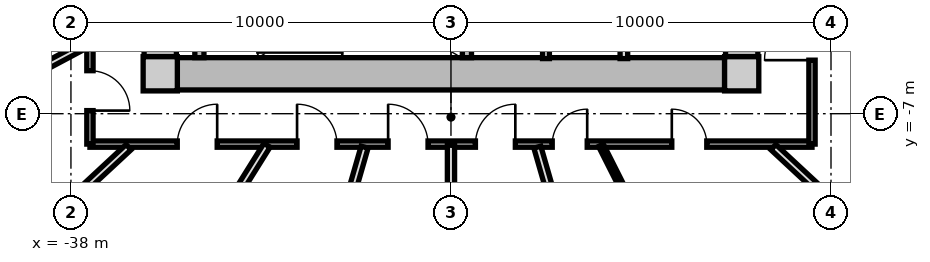
"""IFC4 building model, lengths in metres.
Left out: names, types, materials, properties, quantities, classifications, styles, units other than length and angle.
Written with IfcOpenShell. Run it as: python <this file> out.ifc"""

import sys

from ifc_helpers import new_model, si_unit, direction, frame, frame_2d, origin, origin_2d, place, context, subcontext, project, spatial, rectangle, extrude, source, transform, mapped, element, fill, save


model = new_model("IFC4")
c1 = context("Model", 3, precision=1e-05, world=origin(), true_north=direction((0.0, 1.0)))
c2 = subcontext(c1, "Body", "Model", "MODEL_VIEW")
j1 = project(units=[si_unit("LENGTHUNIT", "METRE"), si_unit("PLANEANGLEUNIT", "RADIAN")], contexts=[c1])
p1 = place(None, origin())
s1 = spatial("IfcSite", under=j1, at=p1, CompositionType="ELEMENT")
p2 = place(p1, origin())
s2 = spatial("IfcBuilding", under=s1, at=p2, CompositionType="ELEMENT")
p3 = place(p2, frame((0.0, 0.0, 46.0)))
s3 = spatial("IfcBuildingStorey", under=s2, at=p3, CompositionType="ELEMENT", Elevation=46.0)
m1 = source(origin(), c2, "Body", "SweptSolid", [
    extrude(rectangle(XDim=0.9, YDim=0.9, at=origin_2d()), origin(), (0.0, 0.0, 1.0), 3.05),
])
for number, where, z_axis, x_axis in (
    (1, (-35.65, -5.95, 0.0), (0.0, 0.0, 1.0), (1.0, 0.0, 0.0)),
    (2, (-20.35, -5.95, 0.0), (0.0, 0.0, 1.0), (1.0, 0.0, 0.0)),
):
    element("IfcColumn", number, at=place(p3, frame(where, z_axis=z_axis, x_axis=x_axis)), inside=s3, PredefinedType="COLUMN", context=c2, shape_type="MappedRepresentation", body=[
        mapped(m1, transform((0.0, 0.0, 0.0), x_axis=(1.0, 0.0, 0.0), y_axis=(0.0, 1.0, 0.0), z_axis=(0.0, 0.0, 1.0), scale=1.0)),
    ])
m2 = source(origin(), c2, "Body", "SweptSolid", [
    extrude(rectangle(XDim=14.4, YDim=0.85, at=frame_2d((7.2, 0.0))), origin(), (0.0, 0.0, 1.0), 2.79),
])
p4 = place(p3, frame((-20.8, -5.95, 0.0), z_axis=(0.0, 0.0, 1.0), x_axis=(-1.0, 0.0, 0.0)))
e3 = element("IfcWall", 3, at=p4, inside=s3, PredefinedType="SHEAR", context=c2, shape_type="MappedRepresentation", body=[
    mapped(m2, transform((0.0, 0.0, 0.0), x_axis=(1.0, 0.0, 0.0), y_axis=(0.0, 1.0, 0.0), z_axis=(0.0, 0.0, 1.0), scale=1.0)),
])
m3 = source(origin(), c2, "Body", "SweptSolid", [
    extrude(rectangle(XDim=11.0, YDim=0.85, at=frame_2d((5.5, 0.0))), origin(), (0.0, 0.0, 1.0), 2.79),
])
p5 = place(p3, frame((-35.65, -5.5, 0.0), z_axis=(0.0, 0.0, 1.0), x_axis=(0.0, 1.0, 0.0)))
e4 = element("IfcWall", 4, at=p5, inside=s3, PredefinedType="SHEAR", context=c2, shape_type="MappedRepresentation", body=[
    mapped(m3, transform((0.0, 0.0, 0.0), x_axis=(1.0, 0.0, 0.0), y_axis=(0.0, 1.0, 0.0), z_axis=(0.0, 0.0, 1.0), scale=1.0)),
])
p6 = place(p5, frame((3.8, 0.0, 0.0)))
e5 = element("IfcOpeningElement", 5, at=p6, cuts=e4, PredefinedType="OPENING", context=c2, shape_type="SweptSolid", body=[
    extrude(rectangle(XDim=1.2, YDim=2.15, at=frame_2d((0.6, 1.075))), frame((0.0, 0.435, 0.0), z_axis=(0.0, -1.0, 0.0), x_axis=(1.0, 0.0, 0.0)), (0.0, 0.0, 1.0), 0.87),
])
p7 = place(p3, frame((-20.35, 5.5, 0.0), z_axis=(0.0, 0.0, 1.0), x_axis=(0.0, -1.0, 0.0)))
e6 = element("IfcWall", 6, at=p7, inside=s3, PredefinedType="SHEAR", context=c2, shape_type="MappedRepresentation", body=[
    mapped(m3, transform((0.0, 0.0, 0.0), x_axis=(1.0, 0.0, 0.0), y_axis=(0.0, 1.0, 0.0), z_axis=(0.0, 0.0, 1.0), scale=1.0)),
])
p8 = place(p7, frame((5.65, 0.0, 0.0)))
e7 = element("IfcOpeningElement", 7, at=p8, cuts=e6, PredefinedType="OPENING", context=c2, shape_type="SweptSolid", body=[
    extrude(rectangle(XDim=1.2, YDim=2.15, at=frame_2d((0.6, 1.075))), frame((0.0, 0.435, 0.0), z_axis=(0.0, -1.0, 0.0), x_axis=(1.0, 0.0, 0.0)), (0.0, 0.0, 1.0), 0.87),
])
m4 = source(origin(), c2, "Body", "SweptSolid", [
    extrude(rectangle(XDim=3.075, YDim=0.24, at=frame_2d((1.538, 0.0))), origin(), (0.0, 0.0, 1.0), 2.79),
])
for number, where, z_axis, x_axis in (
    (8, (-34.62, -5.525, 0.0), (0.0, 0.0, 1.0), (0.0, 1.0, 0.0)),
    (9, (-27.58, -5.525, 0.0), (0.0, 0.0, 1.0), (0.0, 1.0, 0.0)),
):
    element("IfcWall", number, at=place(p3, frame(where, z_axis=z_axis, x_axis=x_axis)), inside=s3, PredefinedType="PARTITIONING", context=c2, shape_type="MappedRepresentation", body=[
        mapped(m4, transform((0.0, 0.0, 0.0), x_axis=(1.0, 0.0, 0.0), y_axis=(0.0, 1.0, 0.0), z_axis=(0.0, 0.0, 1.0), scale=1.0)),
    ])
m5 = source(origin(), c2, "Body", "SweptSolid", [
    extrude(rectangle(XDim=3.8, YDim=0.2, at=frame_2d((1.9, 0.0))), origin(), (0.0, 0.0, 1.0), 2.775),
])
p9 = place(p3, frame((-23.45, -5.55, 0.0), z_axis=(0.0, 0.0, 1.0), x_axis=(0.0, 1.0, 0.0)))
e10 = element("IfcWall", 10, at=p9, inside=s3, PredefinedType="PARTITIONING", context=c2, shape_type="MappedRepresentation", body=[
    mapped(m5, transform((0.0, 0.0, 0.0), x_axis=(1.0, 0.0, 0.0), y_axis=(0.0, 1.0, 0.0), z_axis=(0.0, 0.0, 1.0), scale=1.0)),
])
m6 = source(origin(), c2, "Body", "SweptSolid", [
    extrude(rectangle(XDim=3.22, YDim=0.18, at=frame_2d((1.61, 0.0))), origin(), (0.0, 0.0, 1.0), 2.775),
])
p10 = place(p3, frame((-25.5, -5.55, 0.0), z_axis=(0.0, 0.0, 1.0), x_axis=(0.0, 1.0, 0.0)))
e11 = element("IfcWall", 11, at=p10, inside=s3, PredefinedType="PARTITIONING", context=c2, shape_type="MappedRepresentation", body=[
    mapped(m6, transform((0.0, 0.0, 0.0), x_axis=(1.0, 0.0, 0.0), y_axis=(0.0, 1.0, 0.0), z_axis=(0.0, 0.0, 1.0), scale=1.0)),
])
m7 = source(origin(), c2, "Body", "SweptSolid", [
    extrude(rectangle(XDim=19.0, YDim=0.165, at=frame_2d((9.5, 0.0))), origin(), (0.0, 0.0, 1.0), 2.775),
])
p11 = place(p3, frame((-18.5, -7.8, 0.0), z_axis=(0.0, 0.0, 1.0), x_axis=(-1.0, 0.0, 0.0)))
e12 = element("IfcWall", 12, at=p11, inside=s3, PredefinedType="PARTITIONING", context=c2, shape_type="MappedRepresentation", body=[
    mapped(m7, transform((0.0, 0.0, 0.0), x_axis=(1.0, 0.0, 0.0), y_axis=(0.0, 1.0, 0.0), z_axis=(0.0, 0.0, 1.0), scale=1.0)),
])
p12 = place(p11, frame((15.652, 0.0, 0.0)))
e13 = element("IfcOpeningElement", 13, at=p12, cuts=e12, PredefinedType="OPENING", context=c2, shape_type="SweptSolid", body=[
    extrude(rectangle(XDim=1.05, YDim=2.15, at=frame_2d((0.525, 1.075))), frame((0.0, 0.093, 0.0), z_axis=(0.0, -1.0, 0.0), x_axis=(1.0, 0.0, 0.0)), (0.0, 0.0, 1.0), 0.185),
])
p13 = place(p11, frame((12.5, 0.0, 0.0)))
e14 = element("IfcOpeningElement", 14, at=p13, cuts=e12, PredefinedType="OPENING", context=c2, shape_type="SweptSolid", body=[
    extrude(rectangle(XDim=1.05, YDim=2.15, at=frame_2d((0.525, 1.075))), frame((0.0, 0.093, 0.0), z_axis=(0.0, -1.0, 0.0), x_axis=(1.0, 0.0, 0.0)), (0.0, 0.0, 1.0), 0.185),
])
p14 = place(p11, frame((10.104, 0.0, 0.0)))
e15 = element("IfcOpeningElement", 15, at=p14, cuts=e12, PredefinedType="OPENING", context=c2, shape_type="SweptSolid", body=[
    extrude(rectangle(XDim=1.05, YDim=2.15, at=frame_2d((0.525, 1.075))), frame((0.0, 0.093, 0.0), z_axis=(0.0, -1.0, 0.0), x_axis=(1.0, 0.0, 0.0)), (0.0, 0.0, 1.0), 0.185),
])
p15 = place(p11, frame((7.806, 0.0, 0.0)))
e16 = element("IfcOpeningElement", 16, at=p15, cuts=e12, PredefinedType="OPENING", context=c2, shape_type="SweptSolid", body=[
    extrude(rectangle(XDim=1.05, YDim=2.15, at=frame_2d((0.525, 1.075))), frame((0.0, 0.093, 0.0), z_axis=(0.0, -1.0, 0.0), x_axis=(1.0, 0.0, 0.0)), (0.0, 0.0, 1.0), 0.185),
])
p16 = place(p11, frame((5.915, 0.0, 0.0)))
e17 = element("IfcOpeningElement", 17, at=p16, cuts=e12, PredefinedType="OPENING", context=c2, shape_type="SweptSolid", body=[
    extrude(rectangle(XDim=0.92, YDim=2.1, at=frame_2d((0.46, 1.05))), frame((0.0, 0.093, 0.0), z_axis=(0.0, -1.0, 0.0), x_axis=(1.0, 0.0, 0.0)), (0.0, 0.0, 1.0), 0.185),
])
p17 = place(p11, frame((2.769, 0.0, 0.0)))
e18 = element("IfcOpeningElement", 18, at=p17, cuts=e12, PredefinedType="OPENING", context=c2, shape_type="SweptSolid", body=[
    extrude(rectangle(XDim=0.92, YDim=2.1, at=frame_2d((0.46, 1.05))), frame((0.0, 0.093, 0.0), z_axis=(0.0, -1.0, 0.0), x_axis=(1.0, 0.0, 0.0)), (0.0, 0.0, 1.0), 0.185),
])
m8 = source(origin(), c2, "Body", "SweptSolid", [
    extrude(rectangle(XDim=15.6, YDim=0.165, at=frame_2d((7.8, 0.0))), origin(), (0.0, 0.0, 1.0), 2.775),
])
p18 = place(p3, frame((-37.5, -7.8, 0.0), z_axis=(0.0, 0.0, 1.0), x_axis=(0.0, 1.0, 0.0)))
e19 = element("IfcWall", 19, at=p18, inside=s3, PredefinedType="PARTITIONING", context=c2, shape_type="MappedRepresentation", body=[
    mapped(m8, transform((0.0, 0.0, 0.0), x_axis=(1.0, 0.0, 0.0), y_axis=(0.0, 1.0, 0.0), z_axis=(0.0, 0.0, 1.0), scale=1.0)),
])
p19 = place(p18, frame((13.293, 0.0, 0.0)))
e20 = element("IfcOpeningElement", 20, at=p19, cuts=e19, PredefinedType="OPENING", context=c2, shape_type="SweptSolid", body=[
    extrude(rectangle(XDim=1.05, YDim=2.15, at=frame_2d((0.525, 1.075))), frame((0.0, 0.093, 0.0), z_axis=(0.0, -1.0, 0.0), x_axis=(1.0, 0.0, 0.0)), (0.0, 0.0, 1.0), 0.185),
])
p20 = place(p18, frame((11.018, 0.0, 0.0)))
e21 = element("IfcOpeningElement", 21, at=p20, cuts=e19, PredefinedType="OPENING", context=c2, shape_type="SweptSolid", body=[
    extrude(rectangle(XDim=1.05, YDim=2.15, at=frame_2d((0.525, 1.075))), frame((0.0, 0.093, 0.0), z_axis=(0.0, -1.0, 0.0), x_axis=(1.0, 0.0, 0.0)), (0.0, 0.0, 1.0), 0.185),
])
p21 = place(p18, frame((7.812, 0.0, 0.0)))
e22 = element("IfcOpeningElement", 22, at=p21, cuts=e19, PredefinedType="OPENING", context=c2, shape_type="SweptSolid", body=[
    extrude(rectangle(XDim=1.05, YDim=2.15, at=frame_2d((0.525, 1.075))), frame((0.0, 0.093, 0.0), z_axis=(0.0, -1.0, 0.0), x_axis=(1.0, 0.0, 0.0)), (0.0, 0.0, 1.0), 0.185),
])
p22 = place(p18, frame((6.035, 0.0, 0.0)))
e23 = element("IfcOpeningElement", 23, at=p22, cuts=e19, PredefinedType="OPENING", context=c2, shape_type="SweptSolid", body=[
    extrude(rectangle(XDim=1.05, YDim=2.15, at=frame_2d((0.525, 1.075))), frame((0.0, 0.093, 0.0), z_axis=(0.0, -1.0, 0.0), x_axis=(1.0, 0.0, 0.0)), (0.0, 0.0, 1.0), 0.185),
])
p23 = place(p18, frame((3.489, 0.0, 0.0)))
e24 = element("IfcOpeningElement", 24, at=p23, cuts=e19, PredefinedType="OPENING", context=c2, shape_type="SweptSolid", body=[
    extrude(rectangle(XDim=1.05, YDim=2.15, at=frame_2d((0.525, 1.075))), frame((0.0, 0.093, 0.0), z_axis=(0.0, -1.0, 0.0), x_axis=(1.0, 0.0, 0.0)), (0.0, 0.0, 1.0), 0.185),
])
p24 = place(p18, frame((0.882, 0.0, 0.0)))
e25 = element("IfcOpeningElement", 25, at=p24, cuts=e19, PredefinedType="OPENING", context=c2, shape_type="SweptSolid", body=[
    extrude(rectangle(XDim=1.05, YDim=2.15, at=frame_2d((0.525, 1.075))), frame((0.0, 0.093, 0.0), z_axis=(0.0, -1.0, 0.0), x_axis=(1.0, 0.0, 0.0)), (0.0, 0.0, 1.0), 0.185),
])
p25 = place(p3, frame((-18.5, 7.8, 0.0), z_axis=(0.0, 0.0, 1.0), x_axis=(0.0, -1.0, 0.0)))
e26 = element("IfcWall", 26, at=p25, inside=s3, PredefinedType="PARTITIONING", context=c2, shape_type="MappedRepresentation", body=[
    mapped(m8, transform((0.0, 0.0, 0.0), x_axis=(1.0, 0.0, 0.0), y_axis=(0.0, 1.0, 0.0), z_axis=(0.0, 0.0, 1.0), scale=1.0)),
])
p26 = place(p25, frame((12.141, 0.0, 0.0)))
e27 = element("IfcOpeningElement", 27, at=p26, cuts=e26, PredefinedType="OPENING", context=c2, shape_type="SweptSolid", body=[
    extrude(rectangle(XDim=1.25, YDim=2.2, at=frame_2d((0.625, 1.1))), frame((0.0, 0.093, 0.0), z_axis=(0.0, -1.0, 0.0), x_axis=(1.0, 0.0, 0.0)), (0.0, 0.0, 1.0), 0.185),
])
p27 = place(p25, frame((7.175, 0.0, 0.0)))
e28 = element("IfcOpeningElement", 28, at=p27, cuts=e26, PredefinedType="OPENING", context=c2, shape_type="SweptSolid", body=[
    extrude(rectangle(XDim=1.25, YDim=2.2, at=frame_2d((0.625, 1.1))), frame((0.0, 0.093, 0.0), z_axis=(0.0, -1.0, 0.0), x_axis=(1.0, 0.0, 0.0)), (0.0, 0.0, 1.0), 0.185),
])
p28 = place(p25, frame((2.826, 0.0, 0.0)))
e29 = element("IfcOpeningElement", 29, at=p28, cuts=e26, PredefinedType="OPENING", context=c2, shape_type="SweptSolid", body=[
    extrude(rectangle(XDim=1.05, YDim=2.15, at=frame_2d((0.525, 1.075))), frame((0.0, 0.093, 0.0), z_axis=(0.0, -1.0, 0.0), x_axis=(1.0, 0.0, 0.0)), (0.0, 0.0, 1.0), 0.185),
])
p29 = place(p25, frame((0.881, 0.0, 0.0)))
e30 = element("IfcOpeningElement", 30, at=p29, cuts=e26, PredefinedType="OPENING", context=c2, shape_type="SweptSolid", body=[
    extrude(rectangle(XDim=1.05, YDim=2.15, at=frame_2d((0.525, 1.075))), frame((0.0, 0.093, 0.0), z_axis=(0.0, -1.0, 0.0), x_axis=(1.0, 0.0, 0.0)), (0.0, 0.0, 1.0), 0.185),
])
m9 = source(origin(), c2, "Body", "SweptSolid", [
    extrude(rectangle(XDim=7.435, YDim=0.19, at=frame_2d((3.717, 0.0))), origin(), (0.0, 0.0, 1.0), 2.225),
])
p30 = place(p3, frame((-36.483, -7.88, 0.0), z_axis=(0.0, 0.0, 1.0), x_axis=(-0.732651956848, -0.680603489652, 0.0)))
e31 = element("IfcWall", 31, at=p30, inside=s3, PredefinedType="PARTITIONING", context=c2, shape_type="MappedRepresentation", body=[
    mapped(m9, transform((0.0, 0.0, 0.0), x_axis=(1.0, 0.0, 0.0), y_axis=(0.0, 1.0, 0.0), z_axis=(0.0, 0.0, 1.0), scale=1.0)),
])
m10 = source(origin(), c2, "Body", "SweptSolid", [
    extrude(rectangle(XDim=7.873, YDim=0.19, at=frame_2d((3.937, 0.0))), origin(), (0.0, 0.0, 1.0), 2.775),
])
p31 = place(p3, frame((-37.53, -5.138, 0.0), z_axis=(0.0, 0.0, 1.0), x_axis=(-0.882666052726, -0.470000680175, 0.0)))
e32 = element("IfcWall", 32, at=p31, inside=s3, PredefinedType="PARTITIONING", context=c2, shape_type="MappedRepresentation", body=[
    mapped(m10, transform((0.0, 0.0, 0.0), x_axis=(1.0, 0.0, 0.0), y_axis=(0.0, 1.0, 0.0), z_axis=(0.0, 0.0, 1.0), scale=1.0)),
])
m11 = source(origin(), c2, "Body", "SweptSolid", [
    extrude(rectangle(XDim=10.196, YDim=0.19, at=frame_2d((5.098, 0.0))), origin(), (0.0, 0.0, 1.0), 2.225),
])
p32 = place(p3, frame((-30.273, -7.88, 0.0), z_axis=(0.0, 0.0, 1.0), x_axis=(-0.277136420347, -0.960830580549, 0.0)))
e33 = element("IfcWall", 33, at=p32, inside=s3, PredefinedType="PARTITIONING", context=c2, shape_type="MappedRepresentation", body=[
    mapped(m11, transform((0.0, 0.0, 0.0), x_axis=(1.0, 0.0, 0.0), y_axis=(0.0, 1.0, 0.0), z_axis=(0.0, 0.0, 1.0), scale=1.0)),
])
m12 = source(origin(), c2, "Body", "SweptSolid", [
    extrude(rectangle(XDim=8.818, YDim=0.19, at=frame_2d((4.409, 0.0))), origin(), (0.0, 0.0, 1.0), 2.775),
])
p33 = place(p3, frame((-32.841, -7.83, 0.0), z_axis=(0.0, 0.0, 1.0), x_axis=(-0.529931746109, -0.848040296487, 0.0)))
e34 = element("IfcWall", 34, at=p33, inside=s3, PredefinedType="PARTITIONING", context=c2, shape_type="MappedRepresentation", body=[
    mapped(m12, transform((0.0, 0.0, 0.0), x_axis=(1.0, 0.0, 0.0), y_axis=(0.0, 1.0, 0.0), z_axis=(0.0, 0.0, 1.0), scale=1.0)),
])
p34 = place(p3, frame((-25.727, -7.88, 0.0), z_axis=(0.0, 0.0, 1.0), x_axis=(0.277136420347, -0.960830580549, 0.0)))
e35 = element("IfcWall", 35, at=p34, inside=s3, PredefinedType="PARTITIONING", context=c2, shape_type="MappedRepresentation", body=[
    mapped(m11, transform((0.0, 0.0, 0.0), x_axis=(1.0, 0.0, 0.0), y_axis=(0.0, 1.0, 0.0), z_axis=(0.0, 0.0, 1.0), scale=1.0)),
])
m13 = source(origin(), c2, "Body", "SweptSolid", [
    extrude(rectangle(XDim=9.846, YDim=0.19, at=frame_2d((4.923, 0.0))), origin(), (0.0, 0.0, 1.0), 2.775),
])
p35 = place(p3, frame((-28.0, -7.83, 0.0), z_axis=(0.0, 0.0, 1.0), x_axis=(0.0, -1.0, 0.0)))
e36 = element("IfcWall", 36, at=p35, inside=s3, PredefinedType="PARTITIONING", context=c2, shape_type="MappedRepresentation", body=[
    mapped(m13, transform((0.0, 0.0, 0.0), x_axis=(1.0, 0.0, 0.0), y_axis=(0.0, 1.0, 0.0), z_axis=(0.0, 0.0, 1.0), scale=1.0)),
])
p36 = place(p3, frame((-19.517, -7.88, 0.0), z_axis=(0.0, 0.0, 1.0), x_axis=(0.732651956848, -0.680603489652, 0.0)))
e37 = element("IfcWall", 37, at=p36, inside=s3, PredefinedType="PARTITIONING", context=c2, shape_type="MappedRepresentation", body=[
    mapped(m9, transform((0.0, 0.0, 0.0), x_axis=(1.0, 0.0, 0.0), y_axis=(0.0, 1.0, 0.0), z_axis=(0.0, 0.0, 1.0), scale=1.0)),
])
m14 = source(origin(), c2, "Body", "SweptSolid", [
    extrude(rectangle(XDim=9.225, YDim=0.14, at=frame_2d((4.613, 0.0))), origin(), (0.0, 0.0, 1.0), 2.775),
])
p37 = place(p3, frame((-24.054, -7.83, 0.0), z_axis=(0.0, 0.0, 1.0), x_axis=(0.450460543767, -0.892796336523, 0.0)))
e38 = element("IfcWall", 38, at=p37, inside=s3, PredefinedType="PARTITIONING", context=c2, shape_type="MappedRepresentation", body=[
    mapped(m14, transform((0.0, 0.0, 0.0), x_axis=(1.0, 0.0, 0.0), y_axis=(0.0, 1.0, 0.0), z_axis=(0.0, 0.0, 1.0), scale=1.0)),
])
m15 = source(origin(), c2, "Body", "SweptSolid", [
    extrude(rectangle(XDim=1.05, YDim=2.15, at=frame_2d((0.525, 1.075))), frame((0.0, 0.025, 0.0), z_axis=(0.0, -1.0, 0.0), x_axis=(1.0, 0.0, 0.0)), (0.0, 0.0, 1.0), 0.05),
])
p38 = place(p24, frame((1.05, 0.0, 0.0), z_axis=(0.0, 0.0, 1.0), x_axis=(-1.0, 0.0, 0.0)))
e39 = element("IfcDoor", 39, at=p38, inside=s3, OperationType="SINGLE_SWING_RIGHT", PredefinedType="DOOR", context=c2, shape_type="MappedRepresentation", body=[
    mapped(m15, transform((0.0, 0.0, 0.0), x_axis=(1.0, 0.0, 0.0), y_axis=(0.0, 1.0, 0.0), z_axis=(0.0, 0.0, 1.0), scale=1.0)),
])
fill(e25, e39)
p39 = place(p12, frame((1.05, 0.0, 0.0), z_axis=(0.0, 0.0, 1.0), x_axis=(-1.0, 0.0, 0.0)))
e40 = element("IfcDoor", 40, at=p39, inside=s3, OperationType="SINGLE_SWING_RIGHT", PredefinedType="DOOR", context=c2, shape_type="MappedRepresentation", body=[
    mapped(m15, transform((0.0, 0.0, 0.0), x_axis=(1.0, 0.0, 0.0), y_axis=(0.0, 1.0, 0.0), z_axis=(0.0, 0.0, 1.0), scale=1.0)),
])
fill(e13, e40)
p40 = place(p13, frame((1.05, 0.0, 0.0), z_axis=(0.0, 0.0, 1.0), x_axis=(-1.0, 0.0, 0.0)))
e41 = element("IfcDoor", 41, at=p40, inside=s3, OperationType="SINGLE_SWING_LEFT", PredefinedType="DOOR", context=c2, shape_type="MappedRepresentation", body=[
    mapped(m15, transform((0.0, 0.0, 0.0), x_axis=(1.0, 0.0, 0.0), y_axis=(0.0, 1.0, 0.0), z_axis=(0.0, 0.0, 1.0), scale=1.0)),
])
fill(e14, e41)
p41 = place(p14, frame((1.05, 0.0, 0.0), z_axis=(0.0, 0.0, 1.0), x_axis=(-1.0, 0.0, 0.0)))
e42 = element("IfcDoor", 42, at=p41, inside=s3, OperationType="SINGLE_SWING_LEFT", PredefinedType="DOOR", context=c2, shape_type="MappedRepresentation", body=[
    mapped(m15, transform((0.0, 0.0, 0.0), x_axis=(1.0, 0.0, 0.0), y_axis=(0.0, 1.0, 0.0), z_axis=(0.0, 0.0, 1.0), scale=1.0)),
])
fill(e15, e42)
p42 = place(p15, frame((1.05, 0.0, 0.0), z_axis=(0.0, 0.0, 1.0), x_axis=(-1.0, 0.0, 0.0)))
e43 = element("IfcDoor", 43, at=p42, inside=s3, OperationType="SINGLE_SWING_RIGHT", PredefinedType="DOOR", context=c2, shape_type="MappedRepresentation", body=[
    mapped(m15, transform((0.0, 0.0, 0.0), x_axis=(1.0, 0.0, 0.0), y_axis=(0.0, 1.0, 0.0), z_axis=(0.0, 0.0, 1.0), scale=1.0)),
])
fill(e16, e43)
m16 = source(origin(), c2, "Body", "SweptSolid", [
    extrude(rectangle(XDim=0.92, YDim=2.1, at=frame_2d((0.46, 1.05))), frame((0.0, 0.025, 0.0), z_axis=(0.0, -1.0, 0.0), x_axis=(1.0, 0.0, 0.0)), (0.0, 0.0, 1.0), 0.05),
])
p43 = place(p16, frame((0.92, 0.0, 0.0), z_axis=(0.0, 0.0, 1.0), x_axis=(-1.0, 0.0, 0.0)))
e44 = element("IfcDoor", 44, at=p43, inside=s3, OperationType="SINGLE_SWING_RIGHT", PredefinedType="DOOR", context=c2, shape_type="MappedRepresentation", body=[
    mapped(m16, transform((0.0, 0.0, 0.0), x_axis=(1.0, 0.0, 0.0), y_axis=(0.0, 1.0, 0.0), z_axis=(0.0, 0.0, 1.0), scale=1.0)),
])
fill(e17, e44)
p44 = place(p17, frame((0.92, 0.0, 0.0), z_axis=(0.0, 0.0, 1.0), x_axis=(-1.0, 0.0, 0.0)))
e45 = element("IfcDoor", 45, at=p44, inside=s3, OperationType="SINGLE_SWING_LEFT", PredefinedType="DOOR", context=c2, shape_type="MappedRepresentation", body=[
    mapped(m16, transform((0.0, 0.0, 0.0), x_axis=(1.0, 0.0, 0.0), y_axis=(0.0, 1.0, 0.0), z_axis=(0.0, 0.0, 1.0), scale=1.0)),
])
fill(e18, e45)
m17 = source(origin(), c2, "Body", "SweptSolid", [
    extrude(rectangle(XDim=1.25, YDim=2.2, at=frame_2d((0.625, 1.1))), frame((0.0, 0.025, 0.0), z_axis=(0.0, -1.0, 0.0), x_axis=(1.0, 0.0, 0.0)), (0.0, 0.0, 1.0), 0.05),
])
p45 = place(p26, frame((1.25, 0.0, 0.0), z_axis=(0.0, 0.0, 1.0), x_axis=(-1.0, 0.0, 0.0)))
e46 = element("IfcDoor", 46, at=p45, inside=s3, OperationType="SINGLE_SWING_LEFT", PredefinedType="DOOR", context=c2, shape_type="MappedRepresentation", body=[
    mapped(m17, transform((0.0, 0.0, 0.0), x_axis=(1.0, 0.0, 0.0), y_axis=(0.0, 1.0, 0.0), z_axis=(0.0, 0.0, 1.0), scale=1.0)),
])
fill(e27, e46)
save(model, sys.argv[1])
